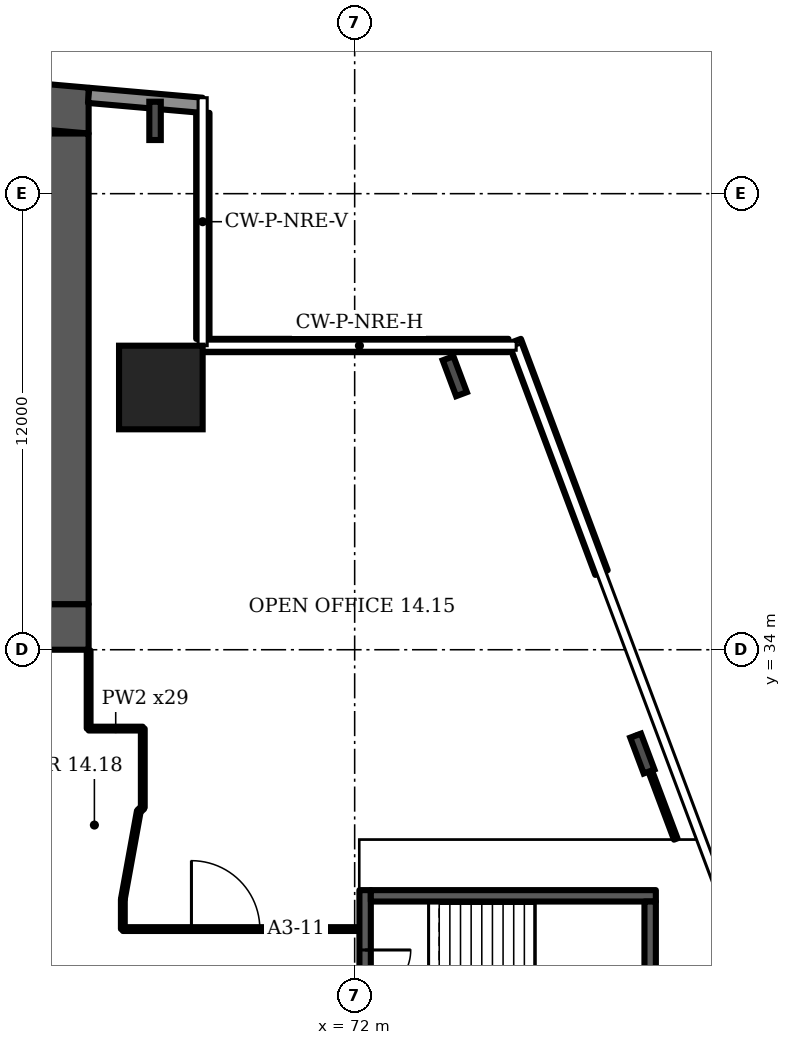
"""IFC4 building model, lengths in metres.
Left out: names, types, materials, properties, quantities, classifications, styles, units other than length and angle.
Written with IfcOpenShell. Run it as: python <this file> out.ifc"""

import sys

from ifc_helpers import new_model, si_unit, direction, frame, frame_2d, origin, origin_2d, place, context, subcontext, project, spatial, polyline, rectangle, i_section, outline, extrude, element, fill, save


model = new_model("IFC4")
c1 = context("Model", 3, precision=1e-05, world=origin(), true_north=direction((0.0, 1.0)))
c2 = subcontext(c1, "Body", "Model", "MODEL_VIEW")
j1 = project(units=[si_unit("LENGTHUNIT", "METRE"), si_unit("PLANEANGLEUNIT", "RADIAN")], contexts=[c1])
p1 = place(None, origin())
s1 = spatial("IfcSite", under=j1, at=p1, CompositionType="ELEMENT")
p2 = place(p1, origin())
s2 = spatial("IfcBuilding", under=s1, at=p2, CompositionType="ELEMENT")
p3 = place(p2, frame((0.0, 0.0, 70.3)))
s3 = spatial("IfcBuildingStorey", under=s2, at=p3, CompositionType="ELEMENT", Elevation=70.3)
p4 = place(p3, frame((0.0, 0.0, -0.0)))
e1 = element("IfcWall", 1, at=p4, inside=s3, PredefinedType="SHEAR", context=c2, shape_type="SweptSolid", body=[
    extrude(outline(polyline([(9.0, 47.583), (37.0, 50.032), (65.0, 47.583), (65.0, 48.787), (37.0, 51.237), (9.0, 48.787), (9.0, 47.583)])), origin(), (0.0, 0.0, 1.0), 3.6),
])
p5 = place(p3, frame((9.0, 34.6, 0.0), z_axis=(0.0, 0.0, 1.0), x_axis=(1.0, 0.0, 0.0)))
e2 = element("IfcWall", 2, at=p5, inside=s3, PredefinedType="SHEAR", context=c2, shape_type="SweptSolid", body=[
    extrude(rectangle(XDim=56.0, YDim=1.2, at=frame_2d((28.0, 0.0))), origin(), (0.0, 0.0, 1.0), 3.6),
])
p6 = place(p5, frame((3.3, 0.0, 0.0)))
e3 = element("IfcOpeningElement", 3, at=p6, cuts=e2, PredefinedType="OPENING", context=c2, shape_type="SweptSolid", body=[
    extrude(rectangle(XDim=1.0, YDim=2.1, at=frame_2d((0.5, 1.05))), frame((0.0, 0.61, 0.0), z_axis=(0.0, -1.0, 0.0), x_axis=(1.0, 0.0, 0.0)), (0.0, 0.0, 1.0), 1.22),
])
p7 = place(p5, frame((7.867, 0.0, 0.0)))
e4 = element("IfcOpeningElement", 4, at=p7, cuts=e2, PredefinedType="OPENING", context=c2, shape_type="SweptSolid", body=[
    extrude(rectangle(XDim=1.1, YDim=2.1, at=frame_2d((0.55, 1.05))), frame((0.0, 0.61, 0.0), z_axis=(0.0, -1.0, 0.0), x_axis=(1.0, 0.0, 0.0)), (0.0, 0.0, 1.0), 1.22),
])
p8 = place(p5, frame((12.033, 0.0, 0.0)))
e5 = element("IfcOpeningElement", 5, at=p8, cuts=e2, PredefinedType="OPENING", context=c2, shape_type="SweptSolid", body=[
    extrude(rectangle(XDim=1.1, YDim=2.1, at=frame_2d((0.55, 1.05))), frame((0.0, 0.61, 0.0), z_axis=(0.0, -1.0, 0.0), x_axis=(1.0, 0.0, 0.0)), (0.0, 0.0, 1.0), 1.22),
])
p9 = place(p5, frame((9.8, 0.0, 0.0)))
e6 = element("IfcOpeningElement", 6, at=p9, cuts=e2, PredefinedType="OPENING", context=c2, shape_type="SweptSolid", body=[
    extrude(rectangle(XDim=1.4, YDim=2.1, at=frame_2d((0.7, 1.05))), frame((0.0, 0.61, 0.0), z_axis=(0.0, -1.0, 0.0), x_axis=(1.0, 0.0, 0.0)), (0.0, 0.0, 1.0), 1.22),
])
p10 = place(p5, frame((14.65, 0.0, 0.0)))
e7 = element("IfcOpeningElement", 7, at=p10, cuts=e2, PredefinedType="OPENING", context=c2, shape_type="SweptSolid", body=[
    extrude(rectangle(XDim=1.2, YDim=2.1, at=frame_2d((0.6, 1.05))), frame((0.0, 0.61, 0.0), z_axis=(0.0, -1.0, 0.0), x_axis=(1.0, 0.0, 0.0)), (0.0, 0.0, 1.0), 1.22),
])
p11 = place(p5, frame((21.867, 0.0, 0.0)))
e8 = element("IfcOpeningElement", 8, at=p11, cuts=e2, PredefinedType="OPENING", context=c2, shape_type="SweptSolid", body=[
    extrude(rectangle(XDim=1.1, YDim=2.1, at=frame_2d((0.55, 1.05))), frame((0.0, 0.61, 0.0), z_axis=(0.0, -1.0, 0.0), x_axis=(1.0, 0.0, 0.0)), (0.0, 0.0, 1.0), 1.22),
])
p12 = place(p5, frame((26.033, 0.0, 0.0)))
e9 = element("IfcOpeningElement", 9, at=p12, cuts=e2, PredefinedType="OPENING", context=c2, shape_type="SweptSolid", body=[
    extrude(rectangle(XDim=1.1, YDim=2.1, at=frame_2d((0.55, 1.05))), frame((0.0, 0.61, 0.0), z_axis=(0.0, -1.0, 0.0), x_axis=(1.0, 0.0, 0.0)), (0.0, 0.0, 1.0), 1.22),
])
p13 = place(p5, frame((23.8, 0.0, 0.0)))
e10 = element("IfcOpeningElement", 10, at=p13, cuts=e2, PredefinedType="OPENING", context=c2, shape_type="SweptSolid", body=[
    extrude(rectangle(XDim=1.4, YDim=2.1, at=frame_2d((0.7, 1.05))), frame((0.0, 0.61, 0.0), z_axis=(0.0, -1.0, 0.0), x_axis=(1.0, 0.0, 0.0)), (0.0, 0.0, 1.0), 1.22),
])
p14 = place(p5, frame((28.867, 0.0, 0.0)))
e11 = element("IfcOpeningElement", 11, at=p14, cuts=e2, PredefinedType="OPENING", context=c2, shape_type="SweptSolid", body=[
    extrude(rectangle(XDim=1.1, YDim=2.1, at=frame_2d((0.55, 1.05))), frame((0.0, 0.61, 0.0), z_axis=(0.0, -1.0, 0.0), x_axis=(1.0, 0.0, 0.0)), (0.0, 0.0, 1.0), 1.22),
])
p15 = place(p5, frame((33.033, 0.0, 0.0)))
e12 = element("IfcOpeningElement", 12, at=p15, cuts=e2, PredefinedType="OPENING", context=c2, shape_type="SweptSolid", body=[
    extrude(rectangle(XDim=1.1, YDim=2.1, at=frame_2d((0.55, 1.05))), frame((0.0, 0.61, 0.0), z_axis=(0.0, -1.0, 0.0), x_axis=(1.0, 0.0, 0.0)), (0.0, 0.0, 1.0), 1.22),
])
p16 = place(p5, frame((40.15, 0.0, 0.0)))
e13 = element("IfcOpeningElement", 13, at=p16, cuts=e2, PredefinedType="OPENING", context=c2, shape_type="SweptSolid", body=[
    extrude(rectangle(XDim=1.2, YDim=2.1, at=frame_2d((0.6, 1.05))), frame((0.0, 0.61, 0.0), z_axis=(0.0, -1.0, 0.0), x_axis=(1.0, 0.0, 0.0)), (0.0, 0.0, 1.0), 1.22),
])
p17 = place(p5, frame((44.8, 0.0, 0.0)))
e14 = element("IfcOpeningElement", 14, at=p17, cuts=e2, PredefinedType="OPENING", context=c2, shape_type="SweptSolid", body=[
    extrude(rectangle(XDim=1.4, YDim=2.1, at=frame_2d((0.7, 1.05))), frame((0.0, 0.61, 0.0), z_axis=(0.0, -1.0, 0.0), x_axis=(1.0, 0.0, 0.0)), (0.0, 0.0, 1.0), 1.22),
])
p18 = place(p5, frame((49.867, 0.0, 0.0)))
e15 = element("IfcOpeningElement", 15, at=p18, cuts=e2, PredefinedType="OPENING", context=c2, shape_type="SweptSolid", body=[
    extrude(rectangle(XDim=1.1, YDim=2.1, at=frame_2d((0.55, 1.05))), frame((0.0, 0.61, 0.0), z_axis=(0.0, -1.0, 0.0), x_axis=(1.0, 0.0, 0.0)), (0.0, 0.0, 1.0), 1.22),
])
p19 = place(p5, frame((53.5, 0.0, 0.0)))
e16 = element("IfcOpeningElement", 16, at=p19, cuts=e2, PredefinedType="OPENING", context=c2, shape_type="SweptSolid", body=[
    extrude(rectangle(XDim=1.1, YDim=2.1, at=frame_2d((0.55, 1.05))), frame((0.0, 0.61, 0.0), z_axis=(0.0, -1.0, 0.0), x_axis=(1.0, 0.0, 0.0)), (0.0, 0.0, 1.0), 1.22),
])
p20 = place(p5, frame((51.567, 0.0, 0.0)))
e17 = element("IfcOpeningElement", 17, at=p20, cuts=e2, PredefinedType="OPENING", context=c2, shape_type="SweptSolid", body=[
    extrude(rectangle(XDim=1.4, YDim=2.1, at=frame_2d((0.7, 1.05))), frame((0.0, 0.61, 0.0), z_axis=(0.0, -1.0, 0.0), x_axis=(1.0, 0.0, 0.0)), (0.0, 0.0, 1.0), 1.22),
])
p21 = place(p3, frame((64.4, 35.2, 0.0), z_axis=(0.0, 0.0, 1.0), x_axis=(0.0, 1.0, 0.0)))
e18 = element("IfcWall", 18, at=p21, inside=s3, PredefinedType="SHEAR", context=c2, shape_type="SweptSolid", body=[
    extrude(rectangle(XDim=12.383, YDim=1.2, at=frame_2d((6.191, 0.0))), origin(), (0.0, 0.0, 1.0), 3.6),
])
p22 = place(p3, frame((66.9, 40.9, 0.0), z_axis=(0.0, 0.0, 1.0), x_axis=(1.0, 0.0, 0.0)))
e19 = element("IfcColumn", 19, at=p22, inside=s3, PredefinedType="COLUMN", context=c2, shape_type="SweptSolid", body=[
    extrude(rectangle(XDim=2.2, YDim=2.2, at=origin_2d()), origin(), (0.0, 0.0, 1.0), 3.6),
])
for number, where, z_axis, x_axis in (
    (20, (79.57, 31.268, 0.0), (0.0, 0.0, 1.0), (0.936, 0.351, 0.0)),
    (21, (74.634, 41.196, 0.0), (0.0, 0.0, 1.0), (0.936, 0.351, 0.0)),
    (22, (66.748, 47.915, 0.0), (0.0, 0.0, 1.0), (1.0, 0.0, 0.0)),
):
    element("IfcColumn", number, at=place(p3, frame(where, z_axis=z_axis, x_axis=x_axis)), inside=s3, PredefinedType="COLUMN", context=c2, shape_type="SweptSolid", body=[
        extrude(i_section(OverallWidth=0.302, OverallDepth=1.008, WebThickness=0.021, FlangeThickness=0.04, FilletRadius=0.03, at=origin_2d()), origin(), (0.0, 0.0, 1.0), 3.6),
    ])
p23 = place(p3, frame((67.983, 48.326, 0.0), z_axis=(0.0, 0.0, 1.0), x_axis=(-0.996194, 0.087168, 0.0)))
e23 = element("IfcWall", 23, at=p23, inside=s3, PredefinedType="SOLIDWALL", context=c2, shape_type="SweptSolid", body=[
    extrude(rectangle(XDim=2.994, YDim=0.4, at=frame_2d((1.497, 0.0))), origin(), (0.0, 0.0, 1.0), 3.2),
])
p24 = place(p3, frame((78.494, 36.03, 0.0), z_axis=(0.0, 0.0, 1.0), x_axis=(-0.351108, 0.936338, 0.0)))
e24 = element("IfcWall", 24, at=p24, inside=s3, PredefinedType="SOLIDWALL", context=c2, shape_type="SweptSolid", body=[
    extrude(rectangle(XDim=6.503, YDim=0.35, at=frame_2d((3.251, 0.0))), origin(), (0.0, 0.0, 1.0), 1.0),
])
p25 = place(p3, frame((76.047, 42.005, 0.0), z_axis=(0.0, 0.0, 1.0), x_axis=(-1.0, 0.0, 0.0)))
e25 = element("IfcWall", 25, at=p25, inside=s3, PredefinedType="SOLIDWALL", context=c2, shape_type="SweptSolid", body=[
    extrude(rectangle(XDim=8.047, YDim=0.35, at=frame_2d((4.023, 0.0))), origin(), (0.0, 0.0, 1.0), 1.0),
])
p26 = place(p3, frame((68.005, 42.18, 0.0), z_axis=(0.0, 0.0, 1.0), x_axis=(0.0, 1.0, 0.0)))
e26 = element("IfcWall", 26, at=p26, inside=s3, PredefinedType="SOLIDWALL", context=c2, shape_type="SweptSolid", body=[
    extrude(rectangle(XDim=5.947, YDim=0.35, at=frame_2d((2.973, 0.0))), origin(), (0.0, 0.0, 1.0), 1.0),
])
p27 = place(p3, frame((72.275, 23.325, 0.0), z_axis=(0.0, 0.0, 1.0), x_axis=(0.0, 1.0, 0.0)))
e27 = element("IfcWall", 27, at=p27, inside=s3, PredefinedType="SHEAR", context=c2, shape_type="SweptSolid", body=[
    extrude(rectangle(XDim=4.35, YDim=0.3, at=frame_2d((2.175, 0.0))), origin(), (0.0, 0.0, 1.0), 3.2),
])
p28 = place(p27, frame((1.575, 0.0, 0.0)))
e28 = element("IfcOpeningElement", 28, at=p28, cuts=e27, PredefinedType="OPENING", context=c2, shape_type="SweptSolid", body=[
    extrude(rectangle(XDim=1.2, YDim=2.1, at=frame_2d((0.6, 1.05))), frame((0.0, 0.16, 0.0), z_axis=(0.0, -1.0, 0.0), x_axis=(1.0, 0.0, 0.0)), (0.0, 0.0, 1.0), 0.32),
])
p29 = place(p3, frame((65.0, 31.925, 0.0), z_axis=(0.0, 0.0, 1.0), x_axis=(0.0, 1.0, 0.0)))
e29 = element("IfcWall", 29, at=p29, inside=s3, PredefinedType="PARTITIONING", context=c2, shape_type="SweptSolid", body=[
    extrude(rectangle(XDim=2.055, YDim=0.1, at=frame_2d((1.027, 0.0))), origin(), (0.0, 0.0, 1.0), 3.2),
])
p30 = place(p3, frame((65.0, 31.925, 0.0), z_axis=(0.0, 0.0, 1.0), x_axis=(1.0, 0.0, 0.0)))
e30 = element("IfcWall", 30, at=p30, inside=s3, PredefinedType="PARTITIONING", context=c2, shape_type="SweptSolid", body=[
    extrude(rectangle(XDim=1.425, YDim=0.1, at=frame_2d((0.712, 0.0))), origin(), (0.0, 0.0, 1.0), 3.2),
])
p31 = place(p3, frame((65.9, 26.65, 0.0), z_axis=(0.0, 0.0, 1.0), x_axis=(0.0, 1.0, 0.0)))
e31 = element("IfcWall", 31, at=p31, inside=s3, PredefinedType="PARTITIONING", context=c2, shape_type="SweptSolid", body=[
    extrude(rectangle(XDim=0.785, YDim=0.1, at=frame_2d((0.393, 0.0))), origin(), (0.0, 0.0, 1.0), 3.2),
])
p32 = place(p3, frame((65.9, 26.65, 0.0), z_axis=(0.0, 0.0, 1.0), x_axis=(1.0, 0.0, 0.0)))
e32 = element("IfcWall", 32, at=p32, inside=s3, PredefinedType="PARTITIONING", context=c2, shape_type="SweptSolid", body=[
    extrude(rectangle(XDim=6.205, YDim=0.1, at=frame_2d((3.103, 0.0))), origin(), (0.0, 0.0, 1.0), 3.2),
])
p33 = place(p32, frame((1.805, 0.0, 0.0)))
e33 = element("IfcOpeningElement", 33, at=p33, cuts=e32, PredefinedType="OPENING", context=c2, shape_type="SweptSolid", body=[
    extrude(rectangle(XDim=1.8, YDim=2.1, at=frame_2d((0.9, 1.05))), frame((0.0, 0.06, 0.0), z_axis=(0.0, -1.0, 0.0), x_axis=(1.0, 0.0, 0.0)), (0.0, 0.0, 1.0), 0.12),
])
p34 = place(p3, frame((65.9, 27.435, 0.0), z_axis=(0.0, 0.0, 1.0), x_axis=(0.178584, 0.983924, 0.0)))
e34 = element("IfcWall", 34, at=p34, inside=s3, PredefinedType="PARTITIONING", context=c2, shape_type="SweptSolid", body=[
    extrude(rectangle(XDim=2.353, YDim=0.1, at=frame_2d((1.176, 0.0))), origin(), (0.0, 0.0, 1.0), 3.2),
])
p35 = place(p3, frame((66.32, 29.75, 0.0), z_axis=(0.0, 0.0, 1.0), x_axis=(0.741581, 0.670872, 0.0)))
e35 = element("IfcWall", 35, at=p35, inside=s3, PredefinedType="PARTITIONING", context=c2, shape_type="SweptSolid", body=[
    extrude(rectangle(XDim=0.142, YDim=0.1, at=frame_2d((0.071, 0.0))), origin(), (0.0, 0.0, 1.0), 3.2),
])
p36 = place(p3, frame((66.425, 29.845, 0.0), z_axis=(0.0, 0.0, 1.0), x_axis=(0.0, 1.0, 0.0)))
e36 = element("IfcWall", 36, at=p36, inside=s3, PredefinedType="PARTITIONING", context=c2, shape_type="SweptSolid", body=[
    extrude(rectangle(XDim=2.08, YDim=0.1, at=frame_2d((1.04, 0.0))), origin(), (0.0, 0.0, 1.0), 3.2),
])
p37 = place(p3, frame((80.448, 29.02, 0.0), z_axis=(0.0, 0.0, 1.0), x_axis=(-0.35129, 0.93627, 0.0)))
e37 = element("IfcWall", 37, at=p37, inside=s3, PredefinedType="PARTITIONING", context=c2, shape_type="SweptSolid", body=[
    extrude(rectangle(XDim=2.911, YDim=0.1, at=frame_2d((1.455, 0.0))), origin(), (0.0, 0.0, 1.0), 2.58),
])
p38 = place(p3, frame((72.425, 27.525, 0.0), z_axis=(0.0, 0.0, 1.0), x_axis=(1.0, 0.0, 0.0)))
e38 = element("IfcWall", 38, at=p38, inside=s3, PredefinedType="SHEAR", context=c2, shape_type="SweptSolid", body=[
    extrude(rectangle(XDim=7.5, YDim=0.3, at=frame_2d((3.75, 0.0))), origin(), (0.0, 0.0, 1.0), 3.2),
])
p39 = place(p3, frame((79.775, 23.625, 0.0), z_axis=(0.0, 0.0, 1.0), x_axis=(0.0, 1.0, 0.0)))
e39 = element("IfcWall", 39, at=p39, inside=s3, PredefinedType="SHEAR", context=c2, shape_type="SweptSolid", body=[
    extrude(rectangle(XDim=3.75, YDim=0.3, at=frame_2d((1.875, 0.0))), origin(), (0.0, 0.0, 1.0), 3.2),
])
p40 = place(p28, origin())
e40 = element("IfcDoor", 40, at=p40, inside=s3, OperationType="SINGLE_SWING_RIGHT", PredefinedType="DOOR", context=c2, shape_type="SweptSolid", body=[
    extrude(rectangle(XDim=1.2, YDim=2.1, at=frame_2d((0.6, 1.05))), frame((0.0, 0.025, 0.0), z_axis=(0.0, -1.0, 0.0), x_axis=(1.0, 0.0, 0.0)), (0.0, 0.0, 1.0), 0.05),
])
fill(e28, e40)
p41 = place(p33, origin())
e41 = element("IfcDoor", 41, at=p41, inside=s3, OperationType="DOUBLE_DOOR_SINGLE_SWING", PredefinedType="DOOR", context=c2, shape_type="SweptSolid", body=[
    extrude(rectangle(XDim=1.8, YDim=2.1, at=frame_2d((0.9, 1.05))), frame((0.0, 0.025, 0.0), z_axis=(0.0, -1.0, 0.0), x_axis=(1.0, 0.0, 0.0)), (0.0, 0.0, 1.0), 0.05),
])
fill(e33, e41)
save(model, sys.argv[1])
